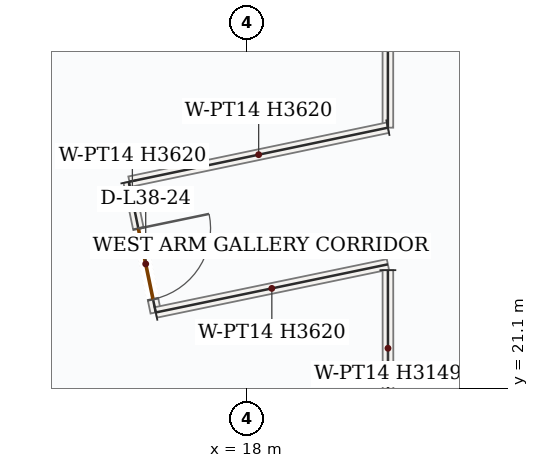
"""IFC4 building model, lengths in metres.
Left out: names, types, materials, properties, quantities, classifications, styles, units other than length and angle.
Written with IfcOpenShell. Run it as: python <this file> out.ifc"""

import sys

from ifc_helpers import new_model, si_unit, direction, frame, frame_2d, origin, place, context, subcontext, project, spatial, rectangle, extrude, source, transform, mapped, element, fill, save


model = new_model("IFC4")
c1 = context("Model", 3, precision=1e-05, world=origin(), true_north=direction((0.0, 1.0)))
c2 = subcontext(c1, "Body", "Model", "MODEL_VIEW")
j1 = project(units=[si_unit("LENGTHUNIT", "METRE"), si_unit("PLANEANGLEUNIT", "RADIAN")], contexts=[c1])
p1 = place(None, origin())
s1 = spatial("IfcSite", under=j1, at=p1, CompositionType="ELEMENT")
p2 = place(p1, origin())
s2 = spatial("IfcBuilding", under=s1, at=p2, CompositionType="ELEMENT")
p3 = place(p2, frame((0.0, 0.0, 166.8)))
s3 = spatial("IfcBuildingStorey", under=s2, at=p3, CompositionType="ELEMENT", Elevation=166.8)
p4 = place(p3, frame((16.44, 23.818, 0.0), z_axis=(0.0, 0.0, 1.0), x_axis=(0.202959786933, -0.979187073489, 0.0)))
e1 = element("IfcWall", 1, at=p4, inside=s3, PredefinedType="PARTITIONING", context=c2, shape_type="SweptSolid", body=[
    extrude(rectangle(XDim=1.755, YDim=0.14, at=frame_2d((0.877, 0.0))), origin(), (0.0, 0.0, 1.0), 3.62),
])
p5 = place(p4, frame((0.628, 0.0, 0.0)))
e2 = element("IfcOpeningElement", 2, at=p5, cuts=e1, PredefinedType="OPENING", context=c2, shape_type="SweptSolid", body=[
    extrude(rectangle(XDim=0.95, YDim=2.15, at=frame_2d((0.475, 1.075))), frame((0.0, 0.08, 0.0), z_axis=(0.0, -1.0, 0.0), x_axis=(1.0, 0.0, 0.0)), (0.0, 0.0, 1.0), 0.16),
])
m1 = source(origin(), c2, "Body", "SweptSolid", [
    extrude(rectangle(XDim=3.119, YDim=0.14, at=frame_2d((1.56, 0.0))), origin(), (0.0, 0.0, 1.0), 3.62),
])
p6 = place(p3, frame((16.796, 22.1, 0.0), z_axis=(0.0, 0.0, 1.0), x_axis=(0.979183767092, 0.202975738114, 0.0)))
e3 = element("IfcWall", 3, at=p6, inside=s3, PredefinedType="PARTITIONING", context=c2, shape_type="MappedRepresentation", body=[
    mapped(m1, transform((0.0, 0.0, 0.0), x_axis=(1.0, 0.0, 0.0), y_axis=(0.0, 1.0, 0.0), z_axis=(0.0, 0.0, 1.0), scale=1.0)),
])
m2 = source(origin(), c2, "Body", "SweptSolid", [
    extrude(rectangle(XDim=2.055, YDim=0.14, at=frame_2d((1.028, 0.0))), origin(), (0.0, 0.0, 1.0), 3.149),
])
p7 = place(p3, frame((19.85, 22.656, 0.0), z_axis=(0.0, 0.0, 1.0), x_axis=(0.001069136951, -0.999999428473, 0.0)))
e4 = element("IfcWall", 4, at=p7, inside=s3, PredefinedType="PARTITIONING", context=c2, shape_type="MappedRepresentation", body=[
    mapped(m2, transform((0.0, 0.0, 0.0), x_axis=(1.0, 0.0, 0.0), y_axis=(0.0, 1.0, 0.0), z_axis=(0.0, 0.0, 1.0), scale=1.0)),
])
m3 = source(origin(), c2, "Body", "SweptSolid", [
    extrude(rectangle(XDim=8.794, YDim=0.14, at=frame_2d((4.397, 0.0))), origin(), (0.0, 0.0, 1.0), 2.766),
])
p8 = place(p3, frame((19.85, 33.325, 0.0), z_axis=(0.0, 0.0, 1.0), x_axis=(-2.7762354e-05, -0.999999999615, 0.0)))
e5 = element("IfcWall", 5, at=p8, inside=s3, PredefinedType="PARTITIONING", context=c2, shape_type="MappedRepresentation", body=[
    mapped(m3, transform((0.0, 0.0, 0.0), x_axis=(1.0, 0.0, 0.0), y_axis=(0.0, 1.0, 0.0), z_axis=(0.0, 0.0, 1.0), scale=1.0)),
])
m4 = source(origin(), c2, "Body", "SweptSolid", [
    extrude(rectangle(XDim=3.474, YDim=0.14, at=frame_2d((1.737, 0.0))), origin(), (0.0, 0.0, 1.0), 3.62),
])
p9 = place(p3, frame((19.85, 24.531, 0.0), z_axis=(0.0, 0.0, 1.0), x_axis=(-0.978846306479, -0.204596941061, 0.0)))
e6 = element("IfcWall", 6, at=p9, inside=s3, PredefinedType="PARTITIONING", context=c2, shape_type="MappedRepresentation", body=[
    mapped(m4, transform((0.0, 0.0, 0.0), x_axis=(1.0, 0.0, 0.0), y_axis=(0.0, 1.0, 0.0), z_axis=(0.0, 0.0, 1.0), scale=1.0)),
])
m5 = source(origin(), c2, "Body", "SweptSolid", [
    extrude(rectangle(XDim=0.95, YDim=2.15, at=frame_2d((0.475, 1.075))), frame((0.0, 0.025, 0.0), z_axis=(0.0, -1.0, 0.0), x_axis=(1.0, 0.0, 0.0)), (0.0, 0.0, 1.0), 0.05),
])
p10 = place(p5, origin())
e7 = element("IfcDoor", 7, at=p10, inside=s3, OperationType="SINGLE_SWING_LEFT", PredefinedType="DOOR", context=c2, shape_type="MappedRepresentation", body=[
    mapped(m5, transform((0.0, 0.0, 0.0), x_axis=(1.0, 0.0, 0.0), y_axis=(0.0, 1.0, 0.0), z_axis=(0.0, 0.0, 1.0), scale=1.0)),
])
fill(e2, e7)
save(model, sys.argv[1])
